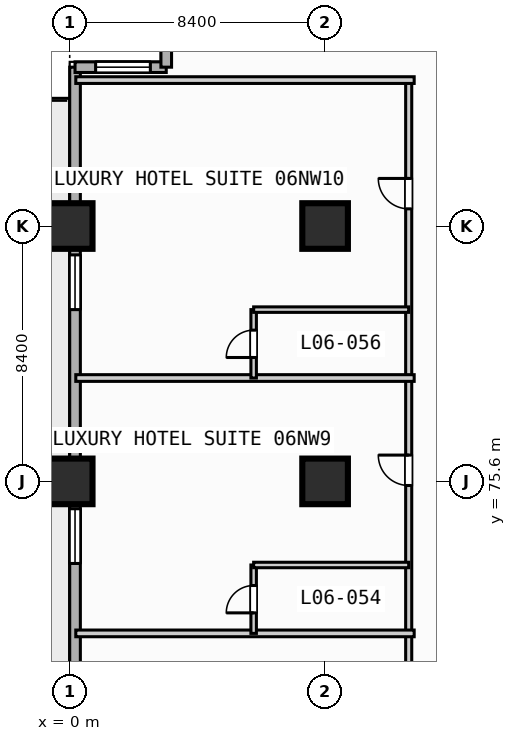
"""IFC4 building model, lengths in metres.
Left out: names, types, materials, properties, quantities, classifications, styles, units other than length and angle.
Written with IfcOpenShell. Run it as: python <this file> out.ifc"""

import sys

from ifc_helpers import new_model, si_unit, direction, frame, frame_2d, origin, origin_2d, place, context, subcontext, project, spatial, rectangle, extrude, element, fill, save


model = new_model("IFC4")
c1 = context("Model", 3, precision=1e-05, world=origin(), true_north=direction((0.0, 1.0)))
c2 = subcontext(c1, "Body", "Model", "MODEL_VIEW")
j1 = project(units=[si_unit("LENGTHUNIT", "METRE"), si_unit("PLANEANGLEUNIT", "RADIAN")], contexts=[c1])
p1 = place(None, origin())
s1 = spatial("IfcSite", under=j1, at=p1, CompositionType="ELEMENT")
p2 = place(p1, origin())
s2 = spatial("IfcBuilding", under=s1, at=p2, CompositionType="ELEMENT")
p3 = place(p2, frame((0.0, 0.0, 32.0)))
s3 = spatial("IfcBuildingStorey", under=s2, at=p3, CompositionType="ELEMENT", Elevation=32.0)
for number, where, z_axis, x_axis in (
    (1, (0.0, 75.6, 0.0), (0.0, 0.0, 1.0), (1.0, 0.0, 0.0)),
    (2, (0.0, 84.0, 0.0), (0.0, 0.0, 1.0), (1.0, 0.0, 0.0)),
    (3, (8.4, 75.6, 0.0), (0.0, 0.0, 1.0), (1.0, 0.0, 0.0)),
    (4, (8.4, 84.0, 0.0), (0.0, 0.0, 1.0), (1.0, 0.0, 0.0)),
):
    element("IfcColumn", number, at=place(p3, frame(where, z_axis=z_axis, x_axis=x_axis)), inside=s3, PredefinedType="COLUMN", context=c2, shape_type="SweptSolid", body=[
        extrude(rectangle(XDim=1.5, YDim=1.5, at=origin_2d()), origin(), (0.0, 0.0, 1.0), 3.8),
    ])
p4 = place(p3, frame((0.175, 3.175, 0.0), z_axis=(0.0, 0.0, 1.0), x_axis=(0.0, 1.0, 0.0)))
e5 = element("IfcWall", 5, at=p4, inside=s3, PredefinedType="STANDARD", context=c2, shape_type="SweptSolid", body=[
    extrude(rectangle(XDim=86.05, YDim=0.35, at=frame_2d((43.025, 0.0))), origin(), (0.0, 0.0, 1.0), 3.55),
])
p5 = place(p4, frame((42.825, 0.0, 0.0)))
e6 = element("IfcOpeningElement", 6, at=p5, cuts=e5, PredefinedType="OPENING", context=c2, shape_type="SweptSolid", body=[
    extrude(rectangle(XDim=1.4, YDim=2.2, at=frame_2d((0.7, 1.1))), frame((0.0, 0.185, 0.0), z_axis=(0.0, -1.0, 0.0), x_axis=(1.0, 0.0, 0.0)), (0.0, 0.0, 1.0), 0.37),
])
p6 = place(p4, frame((2.525, 0.0, 0.85)))
e7 = element("IfcOpeningElement", 7, at=p6, cuts=e5, PredefinedType="OPENING", context=c2, shape_type="SweptSolid", body=[
    extrude(rectangle(XDim=1.8, YDim=1.8, at=frame_2d((0.9, 0.9))), frame((0.0, 0.185, 0.0), z_axis=(0.0, -1.0, 0.0), x_axis=(1.0, 0.0, 0.0)), (0.0, 0.0, 1.0), 0.37),
])
p7 = place(p4, frame((10.925, 0.0, 0.85)))
e8 = element("IfcOpeningElement", 8, at=p7, cuts=e5, PredefinedType="OPENING", context=c2, shape_type="SweptSolid", body=[
    extrude(rectangle(XDim=1.8, YDim=1.8, at=frame_2d((0.9, 0.9))), frame((0.0, 0.185, 0.0), z_axis=(0.0, -1.0, 0.0), x_axis=(1.0, 0.0, 0.0)), (0.0, 0.0, 1.0), 0.37),
])
p8 = place(p4, frame((19.325, 0.0, 0.85)))
e9 = element("IfcOpeningElement", 9, at=p8, cuts=e5, PredefinedType="OPENING", context=c2, shape_type="SweptSolid", body=[
    extrude(rectangle(XDim=1.8, YDim=1.8, at=frame_2d((0.9, 0.9))), frame((0.0, 0.185, 0.0), z_axis=(0.0, -1.0, 0.0), x_axis=(1.0, 0.0, 0.0)), (0.0, 0.0, 1.0), 0.37),
])
p9 = place(p4, frame((27.725, 0.0, 0.85)))
e10 = element("IfcOpeningElement", 10, at=p9, cuts=e5, PredefinedType="OPENING", context=c2, shape_type="SweptSolid", body=[
    extrude(rectangle(XDim=1.8, YDim=1.8, at=frame_2d((0.9, 0.9))), frame((0.0, 0.185, 0.0), z_axis=(0.0, -1.0, 0.0), x_axis=(1.0, 0.0, 0.0)), (0.0, 0.0, 1.0), 0.37),
])
p10 = place(p4, frame((36.125, 0.0, 0.85)))
e11 = element("IfcOpeningElement", 11, at=p10, cuts=e5, PredefinedType="OPENING", context=c2, shape_type="SweptSolid", body=[
    extrude(rectangle(XDim=1.8, YDim=1.8, at=frame_2d((0.9, 0.9))), frame((0.0, 0.185, 0.0), z_axis=(0.0, -1.0, 0.0), x_axis=(1.0, 0.0, 0.0)), (0.0, 0.0, 1.0), 0.37),
])
p11 = place(p4, frame((52.925, 0.0, 0.85)))
e12 = element("IfcOpeningElement", 12, at=p11, cuts=e5, PredefinedType="OPENING", context=c2, shape_type="SweptSolid", body=[
    extrude(rectangle(XDim=1.8, YDim=1.8, at=frame_2d((0.9, 0.9))), frame((0.0, 0.185, 0.0), z_axis=(0.0, -1.0, 0.0), x_axis=(1.0, 0.0, 0.0)), (0.0, 0.0, 1.0), 0.37),
])
p12 = place(p4, frame((61.325, 0.0, 0.85)))
e13 = element("IfcOpeningElement", 13, at=p12, cuts=e5, PredefinedType="OPENING", context=c2, shape_type="SweptSolid", body=[
    extrude(rectangle(XDim=1.8, YDim=1.8, at=frame_2d((0.9, 0.9))), frame((0.0, 0.185, 0.0), z_axis=(0.0, -1.0, 0.0), x_axis=(1.0, 0.0, 0.0)), (0.0, 0.0, 1.0), 0.37),
])
p13 = place(p4, frame((69.725, 0.0, 0.85)))
e14 = element("IfcOpeningElement", 14, at=p13, cuts=e5, PredefinedType="OPENING", context=c2, shape_type="SweptSolid", body=[
    extrude(rectangle(XDim=1.8, YDim=1.8, at=frame_2d((0.9, 0.9))), frame((0.0, 0.185, 0.0), z_axis=(0.0, -1.0, 0.0), x_axis=(1.0, 0.0, 0.0)), (0.0, 0.0, 1.0), 0.37),
])
p14 = place(p4, frame((78.075, 0.0, 0.85)))
e15 = element("IfcOpeningElement", 15, at=p14, cuts=e5, PredefinedType="OPENING", context=c2, shape_type="SweptSolid", body=[
    extrude(rectangle(XDim=1.8, YDim=1.8, at=frame_2d((0.9, 0.9))), frame((0.0, 0.185, 0.0), z_axis=(0.0, -1.0, 0.0), x_axis=(1.0, 0.0, 0.0)), (0.0, 0.0, 1.0), 0.37),
])
p15 = place(p3, frame((0.175, 89.225, 0.0), z_axis=(0.0, 0.0, 1.0), x_axis=(1.0, 0.0, 0.0)))
e16 = element("IfcWall", 16, at=p15, inside=s3, PredefinedType="STANDARD", context=c2, shape_type="SweptSolid", body=[
    extrude(rectangle(XDim=3.0, YDim=0.35, at=frame_2d((1.5, 0.0))), origin(), (0.0, 0.0, 1.0), 3.55),
])
p16 = place(p15, frame((0.677, 0.0, 0.85)))
e17 = element("IfcOpeningElement", 17, at=p16, cuts=e16, PredefinedType="OPENING", context=c2, shape_type="SweptSolid", body=[
    extrude(rectangle(XDim=1.8, YDim=1.8, at=frame_2d((0.9, 0.9))), frame((0.0, 0.185, 0.0), z_axis=(0.0, -1.0, 0.0), x_axis=(1.0, 0.0, 0.0)), (0.0, 0.0, 1.0), 0.37),
])
p17 = place(p3, frame((3.175, 89.225, 0.0), z_axis=(0.0, 0.0, 1.0), x_axis=(0.0, 1.0, 0.0)))
e18 = element("IfcWall", 18, at=p17, inside=s3, PredefinedType="STANDARD", context=c2, shape_type="SweptSolid", body=[
    extrude(rectangle(XDim=3.0, YDim=0.35, at=frame_2d((1.5, 0.0))), origin(), (0.0, 0.0, 1.0), 3.55),
])
p18 = place(p3, frame((11.15, 3.4, 0.0), z_axis=(0.0, 0.0, 1.0), x_axis=(0.0, 1.0, 0.0)))
e19 = element("IfcWall", 19, at=p18, inside=s3, PredefinedType="PARTITIONING", context=c2, shape_type="SweptSolid", body=[
    extrude(rectangle(XDim=85.4, YDim=0.2, at=frame_2d((42.7, 0.0))), origin(), (0.0, 0.0, 1.0), 3.55),
])
p19 = place(p18, frame((4.865, 0.0, 0.0)))
e20 = element("IfcOpeningElement", 20, at=p19, cuts=e19, PredefinedType="OPENING", context=c2, shape_type="SweptSolid", body=[
    extrude(rectangle(XDim=1.0, YDim=2.15, at=frame_2d((0.5, 1.075))), frame((0.0, 0.11, 0.0), z_axis=(0.0, -1.0, 0.0), x_axis=(1.0, 0.0, 0.0)), (0.0, 0.0, 1.0), 0.22),
])
p20 = place(p18, frame((13.265, 0.0, 0.0)))
e21 = element("IfcOpeningElement", 21, at=p20, cuts=e19, PredefinedType="OPENING", context=c2, shape_type="SweptSolid", body=[
    extrude(rectangle(XDim=1.0, YDim=2.15, at=frame_2d((0.5, 1.075))), frame((0.0, 0.11, 0.0), z_axis=(0.0, -1.0, 0.0), x_axis=(1.0, 0.0, 0.0)), (0.0, 0.0, 1.0), 0.22),
])
p21 = place(p18, frame((21.665, 0.0, 0.0)))
e22 = element("IfcOpeningElement", 22, at=p21, cuts=e19, PredefinedType="OPENING", context=c2, shape_type="SweptSolid", body=[
    extrude(rectangle(XDim=1.0, YDim=2.15, at=frame_2d((0.5, 1.075))), frame((0.0, 0.11, 0.0), z_axis=(0.0, -1.0, 0.0), x_axis=(1.0, 0.0, 0.0)), (0.0, 0.0, 1.0), 0.22),
])
p22 = place(p18, frame((30.065, 0.0, 0.0)))
e23 = element("IfcOpeningElement", 23, at=p22, cuts=e19, PredefinedType="OPENING", context=c2, shape_type="SweptSolid", body=[
    extrude(rectangle(XDim=1.0, YDim=2.15, at=frame_2d((0.5, 1.075))), frame((0.0, 0.11, 0.0), z_axis=(0.0, -1.0, 0.0), x_axis=(1.0, 0.0, 0.0)), (0.0, 0.0, 1.0), 0.22),
])
p23 = place(p18, frame((38.465, 0.0, 0.0)))
e24 = element("IfcOpeningElement", 24, at=p23, cuts=e19, PredefinedType="OPENING", context=c2, shape_type="SweptSolid", body=[
    extrude(rectangle(XDim=1.0, YDim=2.15, at=frame_2d((0.5, 1.075))), frame((0.0, 0.11, 0.0), z_axis=(0.0, -1.0, 0.0), x_axis=(1.0, 0.0, 0.0)), (0.0, 0.0, 1.0), 0.22),
])
p24 = place(p18, frame((46.865, 0.0, 0.0)))
e25 = element("IfcOpeningElement", 25, at=p24, cuts=e19, PredefinedType="OPENING", context=c2, shape_type="SweptSolid", body=[
    extrude(rectangle(XDim=1.0, YDim=2.15, at=frame_2d((0.5, 1.075))), frame((0.0, 0.11, 0.0), z_axis=(0.0, -1.0, 0.0), x_axis=(1.0, 0.0, 0.0)), (0.0, 0.0, 1.0), 0.22),
])
p25 = place(p18, frame((55.265, 0.0, 0.0)))
e26 = element("IfcOpeningElement", 26, at=p25, cuts=e19, PredefinedType="OPENING", context=c2, shape_type="SweptSolid", body=[
    extrude(rectangle(XDim=1.0, YDim=2.15, at=frame_2d((0.5, 1.075))), frame((0.0, 0.11, 0.0), z_axis=(0.0, -1.0, 0.0), x_axis=(1.0, 0.0, 0.0)), (0.0, 0.0, 1.0), 0.22),
])
p26 = place(p18, frame((63.665, 0.0, 0.0)))
e27 = element("IfcOpeningElement", 27, at=p26, cuts=e19, PredefinedType="OPENING", context=c2, shape_type="SweptSolid", body=[
    extrude(rectangle(XDim=1.0, YDim=2.15, at=frame_2d((0.5, 1.075))), frame((0.0, 0.11, 0.0), z_axis=(0.0, -1.0, 0.0), x_axis=(1.0, 0.0, 0.0)), (0.0, 0.0, 1.0), 0.22),
])
p27 = place(p18, frame((72.065, 0.0, 0.0)))
e28 = element("IfcOpeningElement", 28, at=p27, cuts=e19, PredefinedType="OPENING", context=c2, shape_type="SweptSolid", body=[
    extrude(rectangle(XDim=1.0, YDim=2.15, at=frame_2d((0.5, 1.075))), frame((0.0, 0.11, 0.0), z_axis=(0.0, -1.0, 0.0), x_axis=(1.0, 0.0, 0.0)), (0.0, 0.0, 1.0), 0.22),
])
p28 = place(p18, frame((81.165, 0.0, 0.0)))
e29 = element("IfcOpeningElement", 29, at=p28, cuts=e19, PredefinedType="OPENING", context=c2, shape_type="SweptSolid", body=[
    extrude(rectangle(XDim=1.0, YDim=2.15, at=frame_2d((0.5, 1.075))), frame((0.0, 0.11, 0.0), z_axis=(0.0, -1.0, 0.0), x_axis=(1.0, 0.0, 0.0)), (0.0, 0.0, 1.0), 0.22),
])
p29 = place(p3, frame((0.2, 70.6, 0.0), z_axis=(0.0, 0.0, 1.0), x_axis=(1.0, 0.0, 0.0)))
e30 = element("IfcWall", 30, at=p29, inside=s3, PredefinedType="PARTITIONING", context=c2, shape_type="SweptSolid", body=[
    extrude(rectangle(XDim=11.13, YDim=0.22, at=frame_2d((5.565, 0.0))), origin(), (0.0, 0.0, 1.0), 3.55),
])
p30 = place(p3, frame((6.05, 70.6, 0.0), z_axis=(0.0, 0.0, 1.0), x_axis=(0.0, 1.0, 0.0)))
e31 = element("IfcWall", 31, at=p30, inside=s3, PredefinedType="PLUMBINGWALL", context=c2, shape_type="SweptSolid", body=[
    extrude(rectangle(XDim=2.25, YDim=0.18, at=frame_2d((1.125, 0.0))), origin(), (0.0, 0.0, 1.0), 3.55),
])
p31 = place(p30, frame((0.675, 0.0, 0.0)))
e32 = element("IfcOpeningElement", 32, at=p31, cuts=e31, PredefinedType="OPENING", context=c2, shape_type="SweptSolid", body=[
    extrude(rectangle(XDim=0.9, YDim=2.1, at=frame_2d((0.45, 1.05))), frame((0.0, 0.1, 0.0), z_axis=(0.0, -1.0, 0.0), x_axis=(1.0, 0.0, 0.0)), (0.0, 0.0, 1.0), 0.2),
])
p32 = place(p3, frame((6.05, 72.85, 0.0), z_axis=(0.0, 0.0, 1.0), x_axis=(1.0, 0.0, 0.0)))
e33 = element("IfcWall", 33, at=p32, inside=s3, PredefinedType="PLUMBINGWALL", context=c2, shape_type="SweptSolid", body=[
    extrude(rectangle(XDim=5.1, YDim=0.18, at=frame_2d((2.55, 0.0))), origin(), (0.0, 0.0, 1.0), 3.55),
])
for number, where, z_axis, x_axis in (
    (34, (0.2, 79.0, 0.0), (0.0, 0.0, 1.0), (1.0, 0.0, 0.0)),
    (35, (0.2, 88.8, 0.0), (0.0, 0.0, 1.0), (1.0, 0.0, 0.0)),
):
    element("IfcWall", number, at=place(p3, frame(where, z_axis=z_axis, x_axis=x_axis)), inside=s3, PredefinedType="PARTITIONING", context=c2, shape_type="SweptSolid", body=[
        extrude(rectangle(XDim=11.13, YDim=0.22, at=frame_2d((5.565, 0.0))), origin(), (0.0, 0.0, 1.0), 3.55),
    ])
p33 = place(p3, frame((6.05, 79.0, 0.0), z_axis=(0.0, 0.0, 1.0), x_axis=(0.0, 1.0, 0.0)))
e36 = element("IfcWall", 36, at=p33, inside=s3, PredefinedType="PLUMBINGWALL", context=c2, shape_type="SweptSolid", body=[
    extrude(rectangle(XDim=2.25, YDim=0.18, at=frame_2d((1.125, 0.0))), origin(), (0.0, 0.0, 1.0), 3.55),
])
p34 = place(p33, frame((0.675, 0.0, 0.0)))
e37 = element("IfcOpeningElement", 37, at=p34, cuts=e36, PredefinedType="OPENING", context=c2, shape_type="SweptSolid", body=[
    extrude(rectangle(XDim=0.9, YDim=2.1, at=frame_2d((0.45, 1.05))), frame((0.0, 0.1, 0.0), z_axis=(0.0, -1.0, 0.0), x_axis=(1.0, 0.0, 0.0)), (0.0, 0.0, 1.0), 0.2),
])
p35 = place(p3, frame((6.05, 81.25, 0.0), z_axis=(0.0, 0.0, 1.0), x_axis=(1.0, 0.0, 0.0)))
e38 = element("IfcWall", 38, at=p35, inside=s3, PredefinedType="PLUMBINGWALL", context=c2, shape_type="SweptSolid", body=[
    extrude(rectangle(XDim=5.1, YDim=0.18, at=frame_2d((2.55, 0.0))), origin(), (0.0, 0.0, 1.0), 3.55),
])
p36 = place(p13, origin())
e39 = element("IfcWindow", 39, at=p36, inside=s3, PartitioningType="SINGLE_PANEL", PredefinedType="WINDOW", context=c2, shape_type="SweptSolid", body=[
    extrude(rectangle(XDim=1.8, YDim=1.8, at=frame_2d((0.9, 0.9))), frame((0.0, 0.03, 0.0), z_axis=(0.0, -1.0, 0.0), x_axis=(1.0, 0.0, 0.0)), (0.0, 0.0, 1.0), 0.06),
])
fill(e14, e39)
p37 = place(p14, origin())
e40 = element("IfcWindow", 40, at=p37, inside=s3, PartitioningType="SINGLE_PANEL", PredefinedType="WINDOW", context=c2, shape_type="SweptSolid", body=[
    extrude(rectangle(XDim=1.8, YDim=1.8, at=frame_2d((0.9, 0.9))), frame((0.0, 0.03, 0.0), z_axis=(0.0, -1.0, 0.0), x_axis=(1.0, 0.0, 0.0)), (0.0, 0.0, 1.0), 0.06),
])
fill(e15, e40)
p38 = place(p16, origin())
e41 = element("IfcWindow", 41, at=p38, inside=s3, PartitioningType="SINGLE_PANEL", PredefinedType="WINDOW", context=c2, shape_type="SweptSolid", body=[
    extrude(rectangle(XDim=1.8, YDim=1.8, at=frame_2d((0.9, 0.9))), frame((0.0, 0.03, 0.0), z_axis=(0.0, -1.0, 0.0), x_axis=(1.0, 0.0, 0.0)), (0.0, 0.0, 1.0), 0.06),
])
fill(e17, e41)
p39 = place(p27, origin())
e42 = element("IfcDoor", 42, at=p39, inside=s3, OperationType="SINGLE_SWING_RIGHT", PredefinedType="DOOR", context=c2, shape_type="SweptSolid", body=[
    extrude(rectangle(XDim=1.0, YDim=2.15, at=frame_2d((0.5, 1.075))), frame((0.0, 0.025, 0.0), z_axis=(0.0, -1.0, 0.0), x_axis=(1.0, 0.0, 0.0)), (0.0, 0.0, 1.0), 0.05),
])
fill(e28, e42)
p40 = place(p28, origin())
e43 = element("IfcDoor", 43, at=p40, inside=s3, OperationType="SINGLE_SWING_RIGHT", PredefinedType="DOOR", context=c2, shape_type="SweptSolid", body=[
    extrude(rectangle(XDim=1.0, YDim=2.15, at=frame_2d((0.5, 1.075))), frame((0.0, 0.025, 0.0), z_axis=(0.0, -1.0, 0.0), x_axis=(1.0, 0.0, 0.0)), (0.0, 0.0, 1.0), 0.05),
])
fill(e29, e43)
p41 = place(p31, origin())
e44 = element("IfcDoor", 44, at=p41, inside=s3, OperationType="SINGLE_SWING_LEFT", PredefinedType="DOOR", context=c2, shape_type="SweptSolid", body=[
    extrude(rectangle(XDim=0.9, YDim=2.1, at=frame_2d((0.45, 1.05))), frame((0.0, 0.025, 0.0), z_axis=(0.0, -1.0, 0.0), x_axis=(1.0, 0.0, 0.0)), (0.0, 0.0, 1.0), 0.05),
])
fill(e32, e44)
p42 = place(p34, origin())
e45 = element("IfcDoor", 45, at=p42, inside=s3, OperationType="SINGLE_SWING_LEFT", PredefinedType="DOOR", context=c2, shape_type="SweptSolid", body=[
    extrude(rectangle(XDim=0.9, YDim=2.1, at=frame_2d((0.45, 1.05))), frame((0.0, 0.025, 0.0), z_axis=(0.0, -1.0, 0.0), x_axis=(1.0, 0.0, 0.0)), (0.0, 0.0, 1.0), 0.05),
])
fill(e37, e45)
save(model, sys.argv[1])
